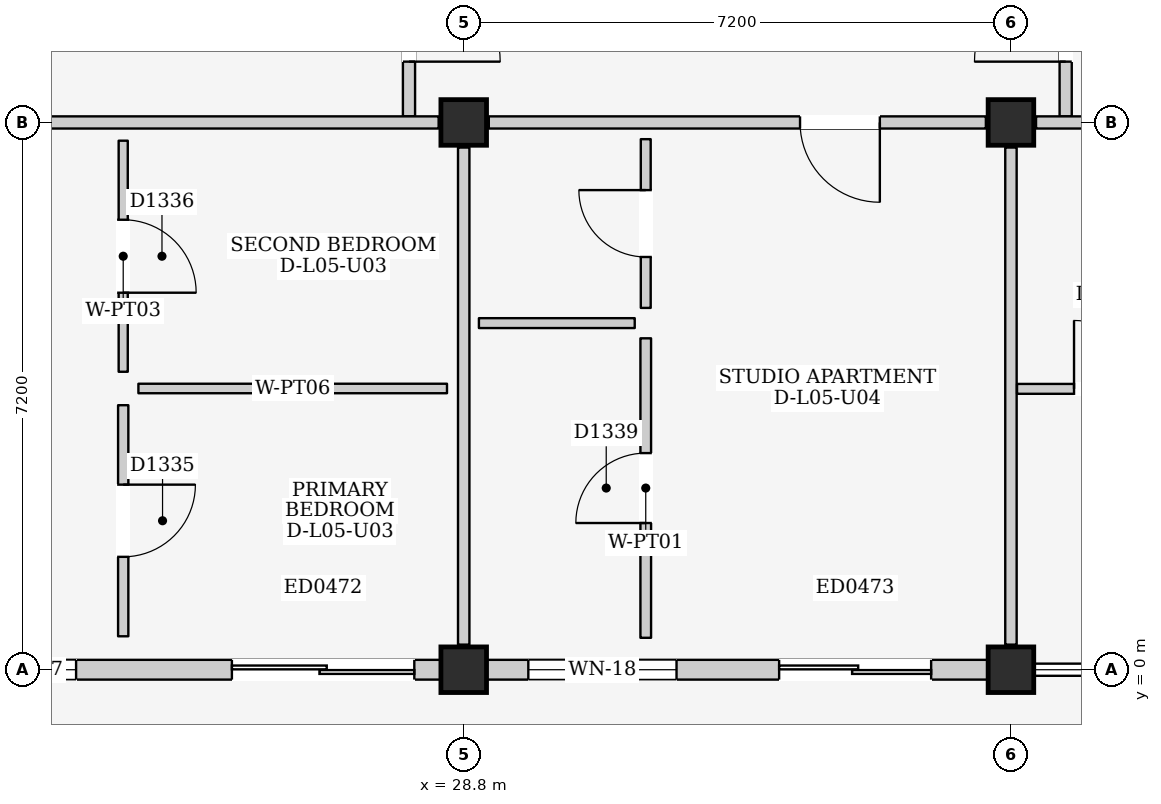
"""IFC4 building model, lengths in metres.
Left out: names, types, materials, properties, quantities, classifications, styles, units other than length and angle.
Written with IfcOpenShell. Run it as: python <this file> out.ifc"""

import sys

from ifc_helpers import new_model, si_unit, direction, frame, frame_2d, origin, origin_2d, place, context, subcontext, project, spatial, rectangle, extrude, element, fill, save


model = new_model("IFC4")
c1 = context("Model", 3, precision=1e-05, world=origin(), true_north=direction((0.0, 1.0)))
c2 = subcontext(c1, "Body", "Model", "MODEL_VIEW")
j1 = project(units=[si_unit("LENGTHUNIT", "METRE"), si_unit("PLANEANGLEUNIT", "RADIAN")], contexts=[c1])
p1 = place(None, origin())
s1 = spatial("IfcSite", under=j1, at=p1, CompositionType="ELEMENT")
p2 = place(p1, origin())
s2 = spatial("IfcBuilding", under=s1, at=p2, CompositionType="ELEMENT")
p3 = place(p2, frame((0.0, 0.0, 18.6)))
s3 = spatial("IfcBuildingStorey", under=s2, at=p3, CompositionType="ELEMENT", Elevation=18.6)
for number, where, z_axis, x_axis in (
    (1, (28.8, 0.0, 0.0), (0.0, 0.0, 1.0), (1.0, 0.0, 0.0)),
    (2, (28.8, 7.2, 0.0), (0.0, 0.0, 1.0), (1.0, 0.0, 0.0)),
    (3, (36.0, 0.0, 0.0), (0.0, 0.0, 1.0), (1.0, 0.0, 0.0)),
    (4, (36.0, 7.2, 0.0), (0.0, 0.0, 1.0), (1.0, 0.0, 0.0)),
):
    element("IfcColumn", number, at=place(p3, frame(where, z_axis=z_axis, x_axis=x_axis)), inside=s3, PredefinedType="COLUMN", context=c2, shape_type="SweptSolid", body=[
        extrude(rectangle(XDim=0.6, YDim=0.6, at=origin_2d()), origin(), (0.0, 0.0, 1.0), 3.3),
    ])
p4 = place(p3, frame((21.9, 0.0, 0.0), z_axis=(0.0, 0.0, 1.0), x_axis=(1.0, 0.0, 0.0)))
e5 = element("IfcWall", 5, at=p4, inside=s3, PredefinedType="ELEMENTEDWALL", context=c2, shape_type="SweptSolid", body=[
    extrude(rectangle(XDim=6.6, YDim=0.26, at=frame_2d((3.3, 0.0))), origin(), (0.0, 0.0, 1.0), 2.595),
])
p5 = place(p4, frame((3.85, 0.0, 0.0)))
e6 = element("IfcOpeningElement", 6, at=p5, cuts=e5, PredefinedType="OPENING", context=c2, shape_type="SweptSolid", body=[
    extrude(rectangle(XDim=2.4, YDim=2.12, at=frame_2d((1.2, 1.06))), frame((0.0, 0.145, 0.0), z_axis=(0.0, -1.0, 0.0), x_axis=(1.0, 0.0, 0.0)), (0.0, 0.0, 1.0), 0.29),
])
p6 = place(p4, frame((0.55, 0.0, 0.9)))
e7 = element("IfcOpeningElement", 7, at=p6, cuts=e5, PredefinedType="OPENING", context=c2, shape_type="SweptSolid", body=[
    extrude(rectangle(XDim=1.25, YDim=1.3, at=frame_2d((0.625, 0.65))), frame((0.0, 0.145, 0.0), z_axis=(0.0, -1.0, 0.0), x_axis=(1.0, 0.0, 0.0)), (0.0, 0.0, 1.0), 0.29),
])
p7 = place(p3, frame((29.1, 0.0, 0.0), z_axis=(0.0, 0.0, 1.0), x_axis=(1.0, 0.0, 0.0)))
e8 = element("IfcWall", 8, at=p7, inside=s3, PredefinedType="ELEMENTEDWALL", context=c2, shape_type="SweptSolid", body=[
    extrude(rectangle(XDim=6.6, YDim=0.26, at=frame_2d((3.3, 0.0))), origin(), (0.0, 0.0, 1.0), 2.595),
])
p8 = place(p7, frame((3.85, 0.0, 0.0)))
e9 = element("IfcOpeningElement", 9, at=p8, cuts=e8, PredefinedType="OPENING", context=c2, shape_type="SweptSolid", body=[
    extrude(rectangle(XDim=2.0, YDim=2.12, at=frame_2d((1.0, 1.06))), frame((0.0, 0.145, 0.0), z_axis=(0.0, -1.0, 0.0), x_axis=(1.0, 0.0, 0.0)), (0.0, 0.0, 1.0), 0.29),
])
p9 = place(p7, frame((0.55, 0.0, 0.9)))
e10 = element("IfcOpeningElement", 10, at=p9, cuts=e8, PredefinedType="OPENING", context=c2, shape_type="SweptSolid", body=[
    extrude(rectangle(XDim=1.95, YDim=1.55, at=frame_2d((0.975, 0.775))), frame((0.0, 0.145, 0.0), z_axis=(0.0, -1.0, 0.0), x_axis=(1.0, 0.0, 0.0)), (0.0, 0.0, 1.0), 0.29),
])
p10 = place(p3, frame((28.08, 7.28, 0.0), z_axis=(0.0, 0.0, 1.0), x_axis=(0.0, 1.0, 0.0)))
e11 = element("IfcWall", 11, at=p10, inside=s3, PredefinedType="PARTITIONING", context=c2, shape_type="SweptSolid", body=[
    extrude(rectangle(XDim=4.32, YDim=0.16, at=frame_2d((2.16, 0.0))), origin(), (0.0, 0.0, 1.0), 3.06),
])
p11 = place(p10, frame((0.72, 0.0, 0.0)))
e12 = element("IfcOpeningElement", 12, at=p11, cuts=e11, PredefinedType="OPENING", context=c2, shape_type="SweptSolid", body=[
    extrude(rectangle(XDim=1.2, YDim=2.2, at=frame_2d((0.6, 1.1))), frame((0.0, 0.095, 0.0), z_axis=(0.0, -1.0, 0.0), x_axis=(1.0, 0.0, 0.0)), (0.0, 0.0, 1.0), 0.19),
])
p12 = place(p3, frame((36.72, 7.28, 0.0), z_axis=(0.0, 0.0, 1.0), x_axis=(0.0, 1.0, 0.0)))
e13 = element("IfcWall", 13, at=p12, inside=s3, PredefinedType="PARTITIONING", context=c2, shape_type="SweptSolid", body=[
    extrude(rectangle(XDim=4.32, YDim=0.16, at=frame_2d((2.16, 0.0))), origin(), (0.0, 0.0, 1.0), 3.06),
])
p13 = place(p12, frame((0.72, 0.0, 0.0)))
e14 = element("IfcOpeningElement", 14, at=p13, cuts=e13, PredefinedType="OPENING", context=c2, shape_type="SweptSolid", body=[
    extrude(rectangle(XDim=1.2, YDim=2.2, at=frame_2d((0.6, 1.1))), frame((0.0, 0.095, 0.0), z_axis=(0.0, -1.0, 0.0), x_axis=(1.0, 0.0, 0.0)), (0.0, 0.0, 1.0), 0.19),
])
p14 = place(p3, frame((21.93, 7.2, 0.0), z_axis=(0.0, 0.0, 1.0), x_axis=(1.0, 0.0, 0.0)))
e15 = element("IfcWall", 15, at=p14, inside=s3, PredefinedType="PARTITIONING", context=c2, shape_type="SweptSolid", body=[
    extrude(rectangle(XDim=6.54, YDim=0.16, at=frame_2d((3.27, 0.0))), origin(), (0.0, 0.0, 1.0), 2.445),
])
p15 = place(p3, frame((28.8, 0.33, 0.0), z_axis=(0.0, 0.0, 1.0), x_axis=(0.0, 1.0, 0.0)))
e16 = element("IfcWall", 16, at=p15, inside=s3, PredefinedType="PARTITIONING", context=c2, shape_type="SweptSolid", body=[
    extrude(rectangle(XDim=6.54, YDim=0.15, at=frame_2d((3.27, 0.0))), origin(), (0.0, 0.0, 1.0), 2.545),
])
p16 = place(p3, frame((24.32, 0.44, 0.0), z_axis=(0.0, 0.0, 1.0), x_axis=(0.0, 1.0, 0.0)))
e17 = element("IfcWall", 17, at=p16, inside=s3, PredefinedType="PARTITIONING", context=c2, shape_type="SweptSolid", body=[
    extrude(rectangle(XDim=3.04, YDim=0.135, at=frame_2d((1.52, 0.0))), origin(), (0.0, 0.0, 1.0), 3.06),
])
p17 = place(p16, frame((1.045, 0.0, 0.0)))
e18 = element("IfcOpeningElement", 18, at=p17, cuts=e17, PredefinedType="OPENING", context=c2, shape_type="SweptSolid", body=[
    extrude(rectangle(XDim=0.95, YDim=2.15, at=frame_2d((0.475, 1.075))), frame((0.0, 0.083, 0.0), z_axis=(0.0, -1.0, 0.0), x_axis=(1.0, 0.0, 0.0)), (0.0, 0.0, 1.0), 0.165),
])
p18 = place(p3, frame((24.52, 3.7, 0.0), z_axis=(0.0, 0.0, 1.0), x_axis=(1.0, 0.0, 0.0)))
e19 = element("IfcWall", 19, at=p18, inside=s3, PredefinedType="PARTITIONING", context=c2, shape_type="SweptSolid", body=[
    extrude(rectangle(XDim=4.06, YDim=0.125, at=frame_2d((2.03, 0.0))), origin(), (0.0, 0.0, 1.0), 3.06),
])
p19 = place(p3, frame((24.32, 3.92, 0.0), z_axis=(0.0, 0.0, 1.0), x_axis=(0.0, 1.0, 0.0)))
e20 = element("IfcWall", 20, at=p19, inside=s3, PredefinedType="PARTITIONING", context=c2, shape_type="SweptSolid", body=[
    extrude(rectangle(XDim=3.04, YDim=0.12, at=frame_2d((1.52, 0.0))), origin(), (0.0, 0.0, 1.0), 3.06),
])
p20 = place(p19, frame((1.04, 0.0, 0.0)))
e21 = element("IfcOpeningElement", 21, at=p20, cuts=e20, PredefinedType="OPENING", context=c2, shape_type="SweptSolid", body=[
    extrude(rectangle(XDim=0.96, YDim=2.15, at=frame_2d((0.48, 1.075))), frame((0.0, 0.075, 0.0), z_axis=(0.0, -1.0, 0.0), x_axis=(1.0, 0.0, 0.0)), (0.0, 0.0, 1.0), 0.15),
])
p21 = place(p3, frame((29.13, 7.2, 0.0), z_axis=(0.0, 0.0, 1.0), x_axis=(1.0, 0.0, 0.0)))
e22 = element("IfcWall", 22, at=p21, inside=s3, PredefinedType="PARTITIONING", context=c2, shape_type="SweptSolid", body=[
    extrude(rectangle(XDim=6.54, YDim=0.16, at=frame_2d((3.27, 0.0))), origin(), (0.0, 0.0, 1.0), 2.445),
])
p22 = place(p21, frame((4.095, 0.0, 0.0)))
e23 = element("IfcOpeningElement", 23, at=p22, cuts=e22, PredefinedType="OPENING", context=c2, shape_type="SweptSolid", body=[
    extrude(rectangle(XDim=1.05, YDim=2.15, at=frame_2d((0.525, 1.075))), frame((0.0, 0.095, 0.0), z_axis=(0.0, -1.0, 0.0), x_axis=(1.0, 0.0, 0.0)), (0.0, 0.0, 1.0), 0.19),
])
p23 = place(p3, frame((36.0, 0.33, 0.0), z_axis=(0.0, 0.0, 1.0), x_axis=(0.0, 1.0, 0.0)))
e24 = element("IfcWall", 24, at=p23, inside=s3, PredefinedType="PARTITIONING", context=c2, shape_type="SweptSolid", body=[
    extrude(rectangle(XDim=6.54, YDim=0.15, at=frame_2d((3.27, 0.0))), origin(), (0.0, 0.0, 1.0), 2.545),
])
p24 = place(p3, frame((29.0, 4.56, 0.0), z_axis=(0.0, 0.0, 1.0), x_axis=(1.0, 0.0, 0.0)))
e25 = element("IfcWall", 25, at=p24, inside=s3, PredefinedType="PARTITIONING", context=c2, shape_type="SweptSolid", body=[
    extrude(rectangle(XDim=2.05, YDim=0.13, at=frame_2d((1.025, 0.0))), origin(), (0.0, 0.0, 1.0), 3.06),
])
p25 = place(p3, frame((31.195, 4.76, 0.0), z_axis=(0.0, 0.0, 1.0), x_axis=(0.0, 1.0, 0.0)))
e26 = element("IfcWall", 26, at=p25, inside=s3, PredefinedType="PARTITIONING", context=c2, shape_type="SweptSolid", body=[
    extrude(rectangle(XDim=2.22, YDim=0.13, at=frame_2d((1.11, 0.0))), origin(), (0.0, 0.0, 1.0), 3.06),
])
p26 = place(p25, frame((0.67, 0.0, 0.0)))
e27 = element("IfcOpeningElement", 27, at=p26, cuts=e26, PredefinedType="OPENING", context=c2, shape_type="SweptSolid", body=[
    extrude(rectangle(XDim=0.88, YDim=2.1, at=frame_2d((0.44, 1.05))), frame((0.0, 0.08, 0.0), z_axis=(0.0, -1.0, 0.0), x_axis=(1.0, 0.0, 0.0)), (0.0, 0.0, 1.0), 0.16),
])
p27 = place(p3, frame((31.195, 0.42, 0.0), z_axis=(0.0, 0.0, 1.0), x_axis=(0.0, 1.0, 0.0)))
e28 = element("IfcWall", 28, at=p27, inside=s3, PredefinedType="PARTITIONING", context=c2, shape_type="SweptSolid", body=[
    extrude(rectangle(XDim=3.94, YDim=0.14, at=frame_2d((1.97, 0.0))), origin(), (0.0, 0.0, 1.0), 3.06),
])
p28 = place(p27, frame((1.51, 0.0, 0.0)))
e29 = element("IfcOpeningElement", 29, at=p28, cuts=e28, PredefinedType="OPENING", context=c2, shape_type="SweptSolid", body=[
    extrude(rectangle(XDim=0.92, YDim=2.1, at=frame_2d((0.46, 1.05))), frame((0.0, 0.085, 0.0), z_axis=(0.0, -1.0, 0.0), x_axis=(1.0, 0.0, 0.0)), (0.0, 0.0, 1.0), 0.17),
])
p29 = place(p3, frame((36.33, 7.2, 0.0), z_axis=(0.0, 0.0, 1.0), x_axis=(1.0, 0.0, 0.0)))
e30 = element("IfcWall", 30, at=p29, inside=s3, PredefinedType="PARTITIONING", context=c2, shape_type="SweptSolid", body=[
    extrude(rectangle(XDim=6.54, YDim=0.16, at=frame_2d((3.27, 0.0))), origin(), (0.0, 0.0, 1.0), 2.445),
])
p30 = place(p3, frame((36.08, 3.695, 0.0), z_axis=(0.0, 0.0, 1.0), x_axis=(1.0, 0.0, 0.0)))
e31 = element("IfcWall", 31, at=p30, inside=s3, PredefinedType="PARTITIONING", context=c2, shape_type="SweptSolid", body=[
    extrude(rectangle(XDim=2.4, YDim=0.13, at=frame_2d((1.2, 0.0))), origin(), (0.0, 0.0, 1.0), 3.06),
])
p31 = place(p30, frame((0.75, 0.0, 0.0)))
e32 = element("IfcOpeningElement", 32, at=p31, cuts=e31, PredefinedType="OPENING", context=c2, shape_type="SweptSolid", body=[
    extrude(rectangle(XDim=0.9, YDim=2.1, at=frame_2d((0.45, 1.05))), frame((0.0, 0.08, 0.0), z_axis=(0.0, -1.0, 0.0), x_axis=(1.0, 0.0, 0.0)), (0.0, 0.0, 1.0), 0.16),
])
p32 = place(p5, frame((2.4, 0.0, 0.0), z_axis=(0.0, 0.0, 1.0), x_axis=(-1.0, 0.0, 0.0)))
e33 = element("IfcDoor", 33, at=p32, inside=s3, OperationType="DOUBLE_DOOR_SLIDING", PredefinedType="DOOR", context=c2, shape_type="SweptSolid", body=[
    extrude(rectangle(XDim=2.4, YDim=2.12, at=frame_2d((1.2, 1.06))), frame((0.0, 0.025, 0.0), z_axis=(0.0, -1.0, 0.0), x_axis=(1.0, 0.0, 0.0)), (0.0, 0.0, 1.0), 0.05),
])
fill(e6, e33)
p33 = place(p6, origin())
e34 = element("IfcWindow", 34, at=p33, inside=s3, PartitioningType="SINGLE_PANEL", PredefinedType="WINDOW", context=c2, shape_type="SweptSolid", body=[
    extrude(rectangle(XDim=1.25, YDim=1.3, at=frame_2d((0.625, 0.65))), frame((0.0, 0.03, 0.0), z_axis=(0.0, -1.0, 0.0), x_axis=(1.0, 0.0, 0.0)), (0.0, 0.0, 1.0), 0.06),
])
fill(e7, e34)
p34 = place(p8, frame((2.0, 0.0, 0.0), z_axis=(0.0, 0.0, 1.0), x_axis=(-1.0, 0.0, 0.0)))
e35 = element("IfcDoor", 35, at=p34, inside=s3, OperationType="DOUBLE_DOOR_SLIDING", PredefinedType="DOOR", context=c2, shape_type="SweptSolid", body=[
    extrude(rectangle(XDim=2.0, YDim=2.12, at=frame_2d((1.0, 1.06))), frame((0.0, 0.025, 0.0), z_axis=(0.0, -1.0, 0.0), x_axis=(1.0, 0.0, 0.0)), (0.0, 0.0, 1.0), 0.05),
])
fill(e9, e35)
p35 = place(p9, origin())
e36 = element("IfcWindow", 36, at=p35, inside=s3, PartitioningType="DOUBLE_PANEL_VERTICAL", PredefinedType="WINDOW", context=c2, shape_type="SweptSolid", body=[
    extrude(rectangle(XDim=1.95, YDim=1.55, at=frame_2d((0.975, 0.775))), frame((0.0, 0.03, 0.0), z_axis=(0.0, -1.0, 0.0), x_axis=(1.0, 0.0, 0.0)), (0.0, 0.0, 1.0), 0.06),
])
fill(e10, e36)
p36 = place(p11, frame((1.2, 0.0, 0.0), z_axis=(0.0, 0.0, 1.0), x_axis=(-1.0, 0.0, 0.0)))
e37 = element("IfcDoor", 37, at=p36, inside=s3, OperationType="SINGLE_SWING_RIGHT", PredefinedType="DOOR", context=c2, shape_type="SweptSolid", body=[
    extrude(rectangle(XDim=1.2, YDim=2.2, at=frame_2d((0.6, 1.1))), frame((0.0, 0.025, 0.0), z_axis=(0.0, -1.0, 0.0), x_axis=(1.0, 0.0, 0.0)), (0.0, 0.0, 1.0), 0.05),
])
fill(e12, e37)
p37 = place(p13, origin())
e38 = element("IfcDoor", 38, at=p37, inside=s3, OperationType="SINGLE_SWING_LEFT", PredefinedType="DOOR", context=c2, shape_type="SweptSolid", body=[
    extrude(rectangle(XDim=1.2, YDim=2.2, at=frame_2d((0.6, 1.1))), frame((0.0, 0.025, 0.0), z_axis=(0.0, -1.0, 0.0), x_axis=(1.0, 0.0, 0.0)), (0.0, 0.0, 1.0), 0.05),
])
fill(e14, e38)
p38 = place(p17, frame((0.95, 0.0, 0.0), z_axis=(0.0, 0.0, 1.0), x_axis=(-1.0, 0.0, 0.0)))
e39 = element("IfcDoor", 39, at=p38, inside=s3, OperationType="SINGLE_SWING_LEFT", PredefinedType="DOOR", context=c2, shape_type="SweptSolid", body=[
    extrude(rectangle(XDim=0.95, YDim=2.15, at=frame_2d((0.475, 1.075))), frame((0.0, 0.025, 0.0), z_axis=(0.0, -1.0, 0.0), x_axis=(1.0, 0.0, 0.0)), (0.0, 0.0, 1.0), 0.05),
])
fill(e18, e39)
p39 = place(p20, frame((0.96, 0.0, 0.0), z_axis=(0.0, 0.0, 1.0), x_axis=(-1.0, 0.0, 0.0)))
e40 = element("IfcDoor", 40, at=p39, inside=s3, OperationType="SINGLE_SWING_RIGHT", PredefinedType="DOOR", context=c2, shape_type="SweptSolid", body=[
    extrude(rectangle(XDim=0.96, YDim=2.15, at=frame_2d((0.48, 1.075))), frame((0.0, 0.025, 0.0), z_axis=(0.0, -1.0, 0.0), x_axis=(1.0, 0.0, 0.0)), (0.0, 0.0, 1.0), 0.05),
])
fill(e21, e40)
p40 = place(p22, frame((1.05, 0.0, 0.0), z_axis=(0.0, 0.0, 1.0), x_axis=(-1.0, 0.0, 0.0)))
e41 = element("IfcDoor", 41, at=p40, inside=s3, OperationType="SINGLE_SWING_LEFT", PredefinedType="DOOR", context=c2, shape_type="SweptSolid", body=[
    extrude(rectangle(XDim=1.05, YDim=2.15, at=frame_2d((0.525, 1.075))), frame((0.0, 0.025, 0.0), z_axis=(0.0, -1.0, 0.0), x_axis=(1.0, 0.0, 0.0)), (0.0, 0.0, 1.0), 0.05),
])
fill(e23, e41)
p41 = place(p26, origin())
e42 = element("IfcDoor", 42, at=p41, inside=s3, OperationType="SINGLE_SWING_RIGHT", PredefinedType="DOOR", context=c2, shape_type="SweptSolid", body=[
    extrude(rectangle(XDim=0.88, YDim=2.1, at=frame_2d((0.44, 1.05))), frame((0.0, 0.025, 0.0), z_axis=(0.0, -1.0, 0.0), x_axis=(1.0, 0.0, 0.0)), (0.0, 0.0, 1.0), 0.05),
])
fill(e27, e42)
p42 = place(p28, origin())
e43 = element("IfcDoor", 43, at=p42, inside=s3, OperationType="SINGLE_SWING_LEFT", PredefinedType="DOOR", context=c2, shape_type="SweptSolid", body=[
    extrude(rectangle(XDim=0.92, YDim=2.1, at=frame_2d((0.46, 1.05))), frame((0.0, 0.025, 0.0), z_axis=(0.0, -1.0, 0.0), x_axis=(1.0, 0.0, 0.0)), (0.0, 0.0, 1.0), 0.05),
])
fill(e29, e43)
p43 = place(p31, origin())
e44 = element("IfcDoor", 44, at=p43, inside=s3, OperationType="SINGLE_SWING_LEFT", PredefinedType="DOOR", context=c2, shape_type="SweptSolid", body=[
    extrude(rectangle(XDim=0.9, YDim=2.1, at=frame_2d((0.45, 1.05))), frame((0.0, 0.025, 0.0), z_axis=(0.0, -1.0, 0.0), x_axis=(1.0, 0.0, 0.0)), (0.0, 0.0, 1.0), 0.05),
])
fill(e32, e44)
save(model, sys.argv[1])
